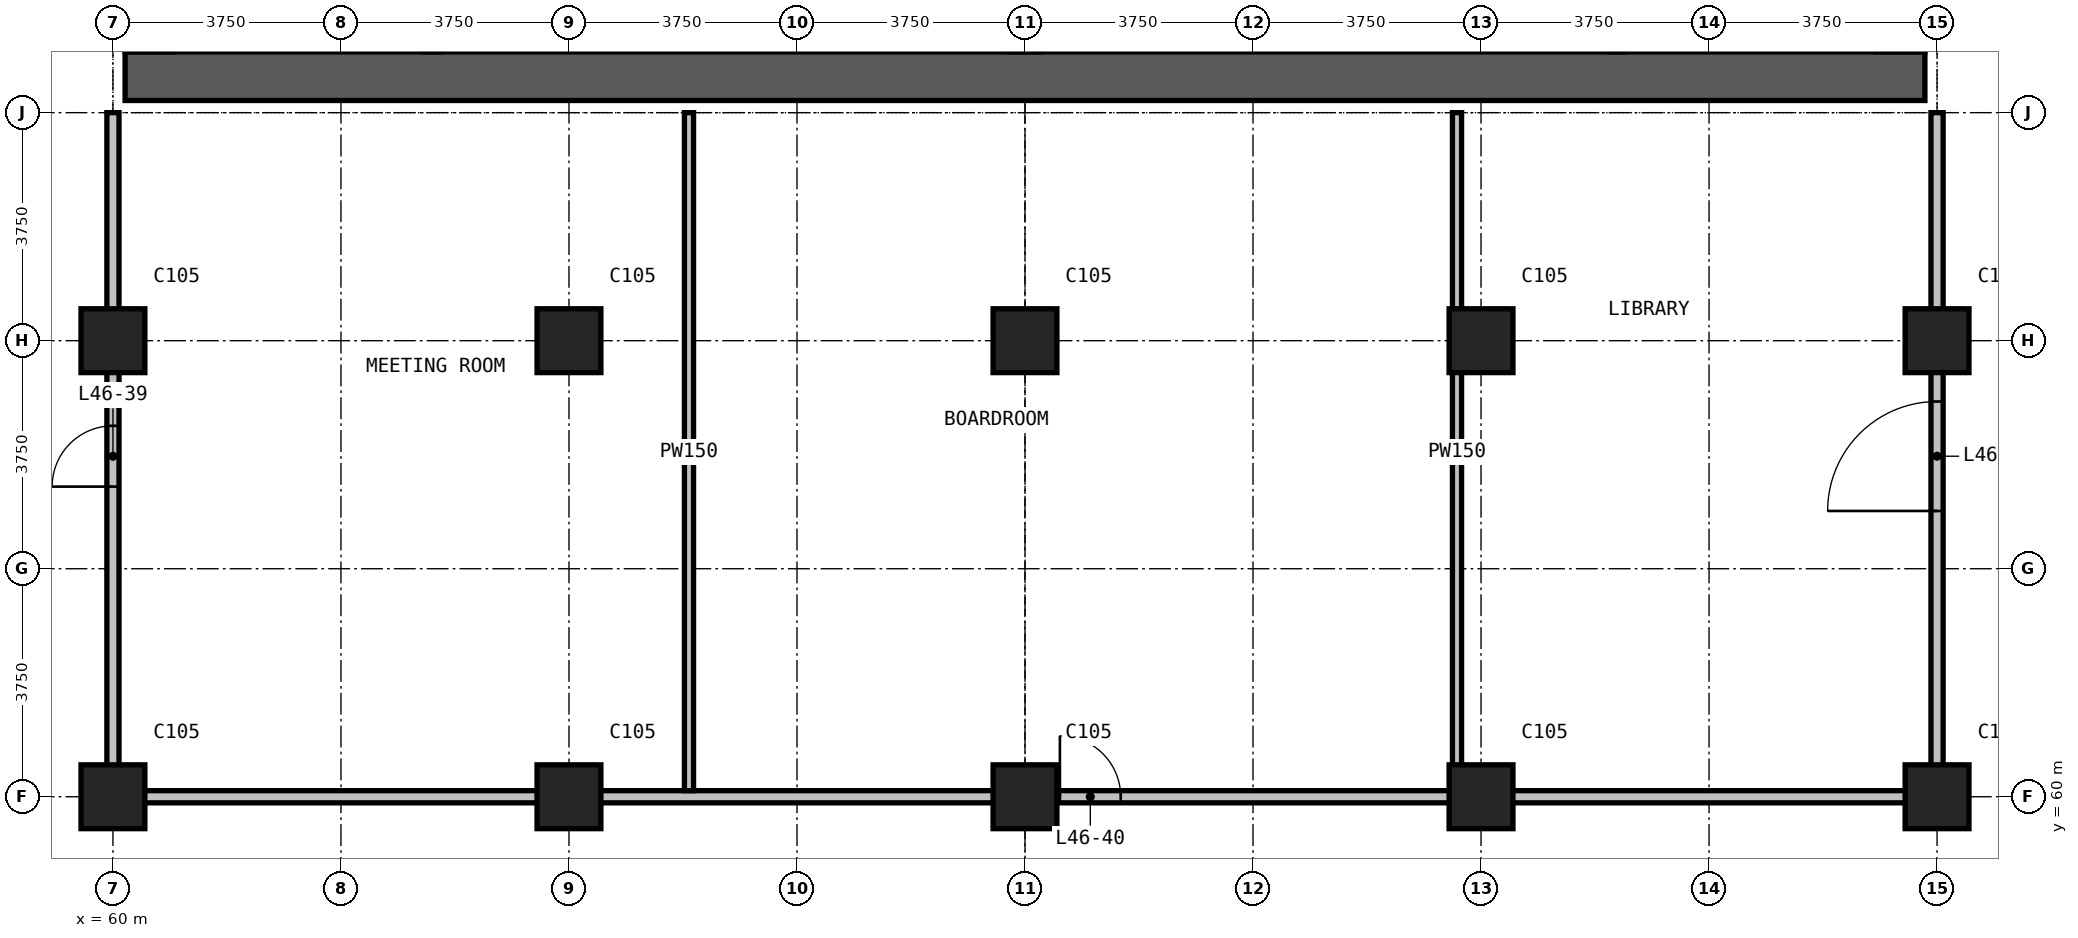
"""IFC4 building model, lengths in metres.
Left out: names, types, materials, properties, quantities, classifications, styles, units other than length and angle.
Written with IfcOpenShell. Run it as: python <this file> out.ifc"""

import sys

from ifc_helpers import new_model, si_unit, direction, frame, frame_2d, origin, origin_2d, place, context, subcontext, project, spatial, rectangle, extrude, element, fill, save


model = new_model("IFC4")
c1 = context("Model", 3, precision=1e-05, world=origin(), true_north=direction((0.0, 1.0)))
c2 = subcontext(c1, "Body", "Model", "MODEL_VIEW")
j1 = project(units=[si_unit("LENGTHUNIT", "METRE"), si_unit("PLANEANGLEUNIT", "RADIAN")], contexts=[c1])
p1 = place(None, origin())
s1 = spatial("IfcSite", under=j1, at=p1, CompositionType="ELEMENT")
p2 = place(p1, origin())
s2 = spatial("IfcBuilding", under=s1, at=p2, CompositionType="ELEMENT")
p3 = place(p2, frame((0.0, 0.0, 180.1)))
s3 = spatial("IfcBuildingStorey", under=s2, at=p3, CompositionType="ELEMENT", Elevation=180.1)
for number, where, z_axis, x_axis in (
    (1, (60.0, 60.0, 0.0), (0.0, 0.0, 1.0), (1.0, 0.0, 0.0)),
    (2, (60.0, 67.5, 0.0), (0.0, 0.0, 1.0), (1.0, 0.0, 0.0)),
    (3, (67.5, 60.0, 0.0), (0.0, 0.0, 1.0), (1.0, 0.0, 0.0)),
    (4, (67.5, 67.5, 0.0), (0.0, 0.0, 1.0), (1.0, 0.0, 0.0)),
    (5, (75.0, 60.0, 0.0), (0.0, 0.0, 1.0), (1.0, 0.0, 0.0)),
    (6, (75.0, 67.5, 0.0), (0.0, 0.0, 1.0), (1.0, 0.0, 0.0)),
    (7, (82.5, 60.0, 0.0), (0.0, 0.0, 1.0), (1.0, 0.0, 0.0)),
    (8, (82.5, 67.5, 0.0), (0.0, 0.0, 1.0), (1.0, 0.0, 0.0)),
    (9, (90.0, 60.0, 0.0), (0.0, 0.0, 1.0), (1.0, 0.0, 0.0)),
    (10, (90.0, 67.5, 0.0), (0.0, 0.0, 1.0), (1.0, 0.0, 0.0)),
):
    element("IfcColumn", number, at=place(p3, frame(where, z_axis=z_axis, x_axis=x_axis)), inside=s3, PredefinedType="COLUMN", context=c2, shape_type="SweptSolid", body=[
        extrude(rectangle(XDim=1.05, YDim=1.05, at=origin_2d()), origin(), (0.0, 0.0, 1.0), 3.6),
    ])
p4 = place(p3, frame((60.2, 71.85, 0.0), z_axis=(0.0, 0.0, 1.0), x_axis=(1.0, 0.0, 0.0)))
e11 = element("IfcWall", 11, at=p4, inside=s3, PredefinedType="SHEAR", context=c2, shape_type="SweptSolid", body=[
    extrude(rectangle(XDim=29.6, YDim=0.8, at=frame_2d((14.8, 0.0))), origin(), (0.0, 0.0, 1.0), 3.6),
])
p5 = place(p3, frame((60.1, 60.0, 0.0), z_axis=(0.0, 0.0, 1.0), x_axis=(1.0, 0.0, 0.0)))
e12 = element("IfcWall", 12, at=p5, inside=s3, PredefinedType="PARTITIONING", context=c2, shape_type="SweptSolid", body=[
    extrude(rectangle(XDim=29.8, YDim=0.2, at=frame_2d((14.9, 0.0))), origin(), (0.0, 0.0, 1.0), 3.25),
])
p6 = place(p5, frame((15.474, 0.0, 0.0)))
e13 = element("IfcOpeningElement", 13, at=p6, cuts=e12, PredefinedType="OPENING", context=c2, shape_type="SweptSolid", body=[
    extrude(rectangle(XDim=1.0, YDim=2.2, at=frame_2d((0.5, 1.1))), frame((0.0, 0.11, 0.0), z_axis=(0.0, -1.0, 0.0), x_axis=(1.0, 0.0, 0.0)), (0.0, 0.0, 1.0), 0.22),
])
p7 = place(p3, frame((60.0, 59.9, 0.0), z_axis=(0.0, 0.0, 1.0), x_axis=(0.0, 1.0, 0.0)))
e14 = element("IfcWall", 14, at=p7, inside=s3, PredefinedType="PARTITIONING", context=c2, shape_type="SweptSolid", body=[
    extrude(rectangle(XDim=11.35, YDim=0.2, at=frame_2d((5.675, 0.0))), origin(), (0.0, 0.0, 1.0), 3.25),
])
p8 = place(p7, frame((5.2, 0.0, 0.0)))
e15 = element("IfcOpeningElement", 15, at=p8, cuts=e14, PredefinedType="OPENING", context=c2, shape_type="SweptSolid", body=[
    extrude(rectangle(XDim=1.0, YDim=2.2, at=frame_2d((0.5, 1.1))), frame((0.0, 0.11, 0.0), z_axis=(0.0, -1.0, 0.0), x_axis=(1.0, 0.0, 0.0)), (0.0, 0.0, 1.0), 0.22),
])
p9 = place(p3, frame((90.0, 59.9, 0.0), z_axis=(0.0, 0.0, 1.0), x_axis=(0.0, 1.0, 0.0)))
e16 = element("IfcWall", 16, at=p9, inside=s3, PredefinedType="PARTITIONING", context=c2, shape_type="SweptSolid", body=[
    extrude(rectangle(XDim=11.35, YDim=0.2, at=frame_2d((5.675, 0.0))), origin(), (0.0, 0.0, 1.0), 3.25),
])
p10 = place(p9, frame((4.8, 0.0, 0.0)))
e17 = element("IfcOpeningElement", 17, at=p10, cuts=e16, PredefinedType="OPENING", context=c2, shape_type="SweptSolid", body=[
    extrude(rectangle(XDim=1.8, YDim=2.2, at=frame_2d((0.9, 1.1))), frame((0.0, 0.11, 0.0), z_axis=(0.0, -1.0, 0.0), x_axis=(1.0, 0.0, 0.0)), (0.0, 0.0, 1.0), 0.22),
])
for number, where, z_axis, x_axis in (
    (18, (69.474, 60.1, 0.0), (0.0, 0.0, 1.0), (0.0, 1.0, 0.0)),
    (19, (82.105, 60.1, 0.0), (0.0, 0.0, 1.0), (0.0, 1.0, 0.0)),
):
    element("IfcWall", number, at=place(p3, frame(where, z_axis=z_axis, x_axis=x_axis)), inside=s3, PredefinedType="PARTITIONING", context=c2, shape_type="SweptSolid", body=[
        extrude(rectangle(XDim=11.15, YDim=0.15, at=frame_2d((5.575, 0.0))), origin(), (0.0, 0.0, 1.0), 3.25),
    ])
p11 = place(p8, origin())
e20 = element("IfcDoor", 20, at=p11, inside=s3, OperationType="SINGLE_SWING_LEFT", PredefinedType="DOOR", context=c2, shape_type="SweptSolid", body=[
    extrude(rectangle(XDim=1.0, YDim=2.2, at=frame_2d((0.5, 1.1))), frame((0.0, 0.025, 0.0), z_axis=(0.0, -1.0, 0.0), x_axis=(1.0, 0.0, 0.0)), (0.0, 0.0, 1.0), 0.05),
])
fill(e15, e20)
p12 = place(p6, origin())
e21 = element("IfcDoor", 21, at=p12, inside=s3, OperationType="SINGLE_SWING_RIGHT", PredefinedType="DOOR", context=c2, shape_type="SweptSolid", body=[
    extrude(rectangle(XDim=1.0, YDim=2.2, at=frame_2d((0.5, 1.1))), frame((0.0, 0.025, 0.0), z_axis=(0.0, -1.0, 0.0), x_axis=(1.0, 0.0, 0.0)), (0.0, 0.0, 1.0), 0.05),
])
fill(e13, e21)
p13 = place(p10, origin())
e22 = element("IfcDoor", 22, at=p13, inside=s3, OperationType="DOUBLE_DOOR_SINGLE_SWING", PredefinedType="DOOR", context=c2, shape_type="SweptSolid", body=[
    extrude(rectangle(XDim=1.8, YDim=2.2, at=frame_2d((0.9, 1.1))), frame((0.0, 0.025, 0.0), z_axis=(0.0, -1.0, 0.0), x_axis=(1.0, 0.0, 0.0)), (0.0, 0.0, 1.0), 0.05),
])
fill(e17, e22)
save(model, sys.argv[1])
